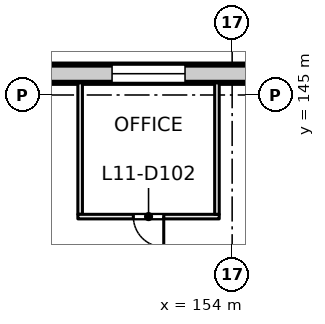
"""IFC4 building model, lengths in metres.
Left out: names, types, materials, properties, quantities, classifications, styles, units other than length and angle.
Written with IfcOpenShell. Run it as: python <this file> out.ifc"""

import sys

from ifc_helpers import new_model, si_unit, direction, frame, frame_2d, origin, place, context, subcontext, project, spatial, rectangle, extrude, element, fill, save


model = new_model("IFC4")
c1 = context("Model", 3, precision=1e-05, world=origin(), true_north=direction((0.0, 1.0)))
c2 = subcontext(c1, "Body", "Model", "MODEL_VIEW")
j1 = project(units=[si_unit("LENGTHUNIT", "METRE"), si_unit("PLANEANGLEUNIT", "RADIAN")], contexts=[c1])
p1 = place(None, origin())
s1 = spatial("IfcSite", under=j1, at=p1, CompositionType="ELEMENT")
p2 = place(p1, origin())
s2 = spatial("IfcBuilding", under=s1, at=p2, CompositionType="ELEMENT")
p3 = place(p2, frame((0.0, 0.0, 51.5)))
s3 = spatial("IfcBuildingStorey", under=s2, at=p3, CompositionType="ELEMENT", Elevation=51.5)
p4 = place(p3, frame((131.07, 145.7, 0.0), z_axis=(0.0, 0.0, 1.0), x_axis=(1.0, 0.0, 0.0)))
e1 = element("IfcWall", 1, at=p4, inside=s3, PredefinedType="SOLIDWALL", context=c2, shape_type="SweptSolid", body=[
    extrude(rectangle(XDim=31.93, YDim=0.6, at=frame_2d((15.965, 0.0))), origin(), (0.0, 0.0, 1.0), 3.625),
])
p5 = place(p4, frame((0.98, 0.0, 0.9)))
e2 = element("IfcOpeningElement", 2, at=p5, cuts=e1, PredefinedType="OPENING", context=c2, shape_type="SweptSolid", body=[
    extrude(rectangle(XDim=2.4, YDim=2.4, at=frame_2d((1.2, 1.2))), frame((0.0, 0.31, 0.0), z_axis=(0.0, -1.0, 0.0), x_axis=(1.0, 0.0, 0.0)), (0.0, 0.0, 1.0), 0.62),
])
p6 = place(p4, frame((5.48, 0.0, 0.9)))
e3 = element("IfcOpeningElement", 3, at=p6, cuts=e1, PredefinedType="OPENING", context=c2, shape_type="SweptSolid", body=[
    extrude(rectangle(XDim=2.4, YDim=2.4, at=frame_2d((1.2, 1.2))), frame((0.0, 0.31, 0.0), z_axis=(0.0, -1.0, 0.0), x_axis=(1.0, 0.0, 0.0)), (0.0, 0.0, 1.0), 0.62),
])
p7 = place(p4, frame((9.98, 0.0, 0.9)))
e4 = element("IfcOpeningElement", 4, at=p7, cuts=e1, PredefinedType="OPENING", context=c2, shape_type="SweptSolid", body=[
    extrude(rectangle(XDim=2.4, YDim=2.4, at=frame_2d((1.2, 1.2))), frame((0.0, 0.31, 0.0), z_axis=(0.0, -1.0, 0.0), x_axis=(1.0, 0.0, 0.0)), (0.0, 0.0, 1.0), 0.62),
])
p8 = place(p4, frame((14.48, 0.0, 0.9)))
e5 = element("IfcOpeningElement", 5, at=p8, cuts=e1, PredefinedType="OPENING", context=c2, shape_type="SweptSolid", body=[
    extrude(rectangle(XDim=2.4, YDim=2.4, at=frame_2d((1.2, 1.2))), frame((0.0, 0.31, 0.0), z_axis=(0.0, -1.0, 0.0), x_axis=(1.0, 0.0, 0.0)), (0.0, 0.0, 1.0), 0.62),
])
p9 = place(p4, frame((18.98, 0.0, 0.9)))
e6 = element("IfcOpeningElement", 6, at=p9, cuts=e1, PredefinedType="OPENING", context=c2, shape_type="SweptSolid", body=[
    extrude(rectangle(XDim=2.4, YDim=2.4, at=frame_2d((1.2, 1.2))), frame((0.0, 0.31, 0.0), z_axis=(0.0, -1.0, 0.0), x_axis=(1.0, 0.0, 0.0)), (0.0, 0.0, 1.0), 0.62),
])
p10 = place(p4, frame((23.48, 0.0, 0.9)))
e7 = element("IfcOpeningElement", 7, at=p10, cuts=e1, PredefinedType="OPENING", context=c2, shape_type="SweptSolid", body=[
    extrude(rectangle(XDim=2.4, YDim=2.4, at=frame_2d((1.2, 1.2))), frame((0.0, 0.31, 0.0), z_axis=(0.0, -1.0, 0.0), x_axis=(1.0, 0.0, 0.0)), (0.0, 0.0, 1.0), 0.62),
])
p11 = place(p4, frame((27.98, 0.0, 0.9)))
e8 = element("IfcOpeningElement", 8, at=p11, cuts=e1, PredefinedType="OPENING", context=c2, shape_type="SweptSolid", body=[
    extrude(rectangle(XDim=2.4, YDim=2.4, at=frame_2d((1.2, 1.2))), frame((0.0, 0.31, 0.0), z_axis=(0.0, -1.0, 0.0), x_axis=(1.0, 0.0, 0.0)), (0.0, 0.0, 1.0), 0.62),
])
p12 = place(p3, frame((149.0, 141.075, 0.0), z_axis=(0.0, 0.0, 1.0), x_axis=(0.0, 1.0, 0.0)))
e9 = element("IfcWall", 9, at=p12, inside=s3, PredefinedType="PARTITIONING", context=c2, shape_type="SweptSolid", body=[
    extrude(rectangle(XDim=4.325, YDim=0.15, at=frame_2d((2.163, 0.0))), origin(), (0.0, 0.0, 1.0), 3.625),
])
p13 = place(p3, frame((153.575, 141.0, 0.0), z_axis=(0.0, 0.0, 1.0), x_axis=(-1.0, 0.0, 0.0)))
e10 = element("IfcWall", 10, at=p13, inside=s3, PredefinedType="PARTITIONING", context=c2, shape_type="SweptSolid", body=[
    extrude(rectangle(XDim=4.65, YDim=0.15, at=frame_2d((2.325, 0.0))), origin(), (0.0, 0.0, 1.0), 3.625),
])
p14 = place(p13, frame((1.825, 0.0, 0.0)))
e11 = element("IfcOpeningElement", 11, at=p14, cuts=e10, PredefinedType="OPENING", context=c2, shape_type="SweptSolid", body=[
    extrude(rectangle(XDim=1.0, YDim=2.1, at=frame_2d((0.5, 1.05))), frame((0.0, 0.085, 0.0), z_axis=(0.0, -1.0, 0.0), x_axis=(1.0, 0.0, 0.0)), (0.0, 0.0, 1.0), 0.17),
])
p15 = place(p3, frame((153.5, 145.4, 0.0), z_axis=(0.0, 0.0, 1.0), x_axis=(0.0, -1.0, 0.0)))
e12 = element("IfcWall", 12, at=p15, inside=s3, PredefinedType="PARTITIONING", context=c2, shape_type="SweptSolid", body=[
    extrude(rectangle(XDim=4.325, YDim=0.15, at=frame_2d((2.163, 0.0))), origin(), (0.0, 0.0, 1.0), 3.625),
])
p16 = place(p9, origin())
e13 = element("IfcWindow", 13, at=p16, inside=s3, PartitioningType="SINGLE_PANEL", PredefinedType="WINDOW", context=c2, shape_type="SweptSolid", body=[
    extrude(rectangle(XDim=2.4, YDim=2.4, at=frame_2d((1.2, 1.2))), frame((0.0, 0.03, 0.0), z_axis=(0.0, -1.0, 0.0), x_axis=(1.0, 0.0, 0.0)), (0.0, 0.0, 1.0), 0.06),
])
fill(e6, e13)
p17 = place(p14, origin())
e14 = element("IfcDoor", 14, at=p17, inside=s3, OperationType="SINGLE_SWING_LEFT", PredefinedType="DOOR", context=c2, shape_type="SweptSolid", body=[
    extrude(rectangle(XDim=1.0, YDim=2.1, at=frame_2d((0.5, 1.05))), frame((0.0, 0.025, 0.0), z_axis=(0.0, -1.0, 0.0), x_axis=(1.0, 0.0, 0.0)), (0.0, 0.0, 1.0), 0.05),
])
fill(e11, e14)
save(model, sys.argv[1])
